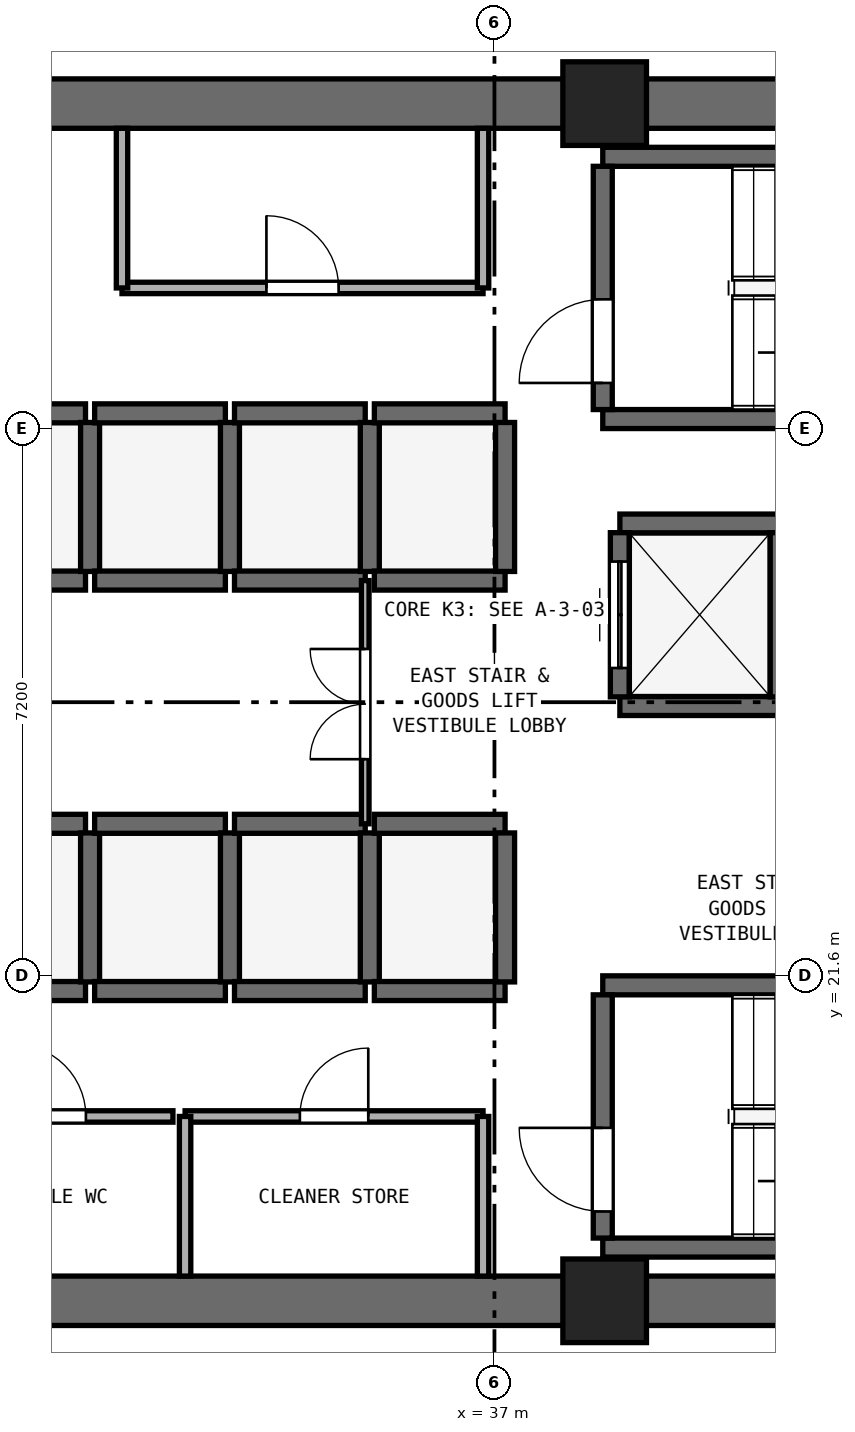
"""IFC4 building model, lengths in metres.
Left out: names, types, materials, properties, quantities, classifications, styles, units other than length and angle.
Written with IfcOpenShell. Run it as: python <this file> out.ifc"""

import sys

from ifc_helpers import new_model, si_unit, direction, frame, frame_2d, origin, origin_2d, place, context, subcontext, project, spatial, rectangle, extrude, element, fill, save


model = new_model("IFC4")
c1 = context("Model", 3, precision=1e-05, world=origin(), true_north=direction((0.0, 1.0)))
c2 = subcontext(c1, "Body", "Model", "MODEL_VIEW")
j1 = project(units=[si_unit("LENGTHUNIT", "METRE"), si_unit("PLANEANGLEUNIT", "RADIAN")], contexts=[c1])
p1 = place(None, origin())
s1 = spatial("IfcSite", under=j1, at=p1, CompositionType="ELEMENT")
p2 = place(p1, origin())
s2 = spatial("IfcBuilding", under=s1, at=p2, CompositionType="ELEMENT")
p3 = place(p2, frame((0.0, 0.0, 97.2)))
s3 = spatial("IfcBuildingStorey", under=s2, at=p3, CompositionType="ELEMENT", Elevation=97.2)
for number, where, z_axis, x_axis in (
    (1, (25.4, 17.325, 0.0), (0.0, 0.0, 1.0), (1.0, 0.0, 0.0)),
    (2, (25.4, 33.075, 0.0), (0.0, 0.0, 1.0), (1.0, 0.0, 0.0)),
):
    element("IfcWall", number, at=place(p3, frame(where, z_axis=z_axis, x_axis=x_axis)), inside=s3, PredefinedType="SHEAR", context=c2, shape_type="SweptSolid", body=[
        extrude(rectangle(XDim=23.2, YDim=0.65, at=frame_2d((11.6, 0.0))), origin(), (0.0, 0.0, 1.0), 3.525),
    ])
for number, where, z_axis, x_axis in (
    (3, (38.45, 17.325, 0.0), (0.0, 0.0, 1.0), (1.0, 0.0, 0.0)),
    (4, (38.45, 33.075, 0.0), (0.0, 0.0, 1.0), (1.0, 0.0, 0.0)),
):
    element("IfcColumn", number, at=place(p3, frame(where, z_axis=z_axis, x_axis=x_axis)), inside=s3, PredefinedType="PILASTER", context=c2, shape_type="SweptSolid", body=[
        extrude(rectangle(XDim=1.1, YDim=1.1, at=origin_2d()), origin(), (0.0, 0.0, 1.0), 3.8),
    ])
for number, where, z_axis, x_axis in (
    (5, (38.425, 28.925, 0.0), (0.0, 0.0, 1.0), (1.0, 0.0, 0.0)),
    (6, (38.425, 32.375, 0.0), (0.0, 0.0, 1.0), (1.0, 0.0, 0.0)),
):
    element("IfcWall", number, at=place(p3, frame(where, z_axis=z_axis, x_axis=x_axis)), inside=s3, PredefinedType="SHEAR", context=c2, shape_type="SweptSolid", body=[
        extrude(rectangle(XDim=7.3, YDim=0.25, at=frame_2d((3.65, 0.0))), origin(), (0.0, 0.0, 1.0), 3.525),
    ])
p4 = place(p3, frame((38.425, 29.05, 0.0), z_axis=(0.0, 0.0, 1.0), x_axis=(0.0, 1.0, 0.0)))
e7 = element("IfcWall", 7, at=p4, inside=s3, PredefinedType="SHEAR", context=c2, shape_type="SweptSolid", body=[
    extrude(rectangle(XDim=3.2, YDim=0.25, at=frame_2d((1.6, 0.0))), origin(), (0.0, 0.0, 1.0), 3.525),
])
p5 = place(p4, frame((0.35, 0.0, 0.0)))
e8 = element("IfcOpeningElement", 8, at=p5, cuts=e7, PredefinedType="OPENING", context=c2, shape_type="SweptSolid", body=[
    extrude(rectangle(XDim=1.1, YDim=2.15, at=frame_2d((0.55, 1.075))), frame((0.0, 0.135, 0.0), z_axis=(0.0, -1.0, 0.0), x_axis=(1.0, 0.0, 0.0)), (0.0, 0.0, 1.0), 0.27),
])
for number, where, z_axis, x_axis in (
    (9, (38.425, 18.025, 0.0), (0.0, 0.0, 1.0), (1.0, 0.0, 0.0)),
    (10, (38.425, 21.475, 0.0), (0.0, 0.0, 1.0), (1.0, 0.0, 0.0)),
):
    element("IfcWall", number, at=place(p3, frame(where, z_axis=z_axis, x_axis=x_axis)), inside=s3, PredefinedType="SHEAR", context=c2, shape_type="SweptSolid", body=[
        extrude(rectangle(XDim=7.3, YDim=0.25, at=frame_2d((3.65, 0.0))), origin(), (0.0, 0.0, 1.0), 3.525),
    ])
p6 = place(p3, frame((38.425, 18.15, 0.0), z_axis=(0.0, 0.0, 1.0), x_axis=(0.0, 1.0, 0.0)))
e11 = element("IfcWall", 11, at=p6, inside=s3, PredefinedType="SHEAR", context=c2, shape_type="SweptSolid", body=[
    extrude(rectangle(XDim=3.2, YDim=0.25, at=frame_2d((1.6, 0.0))), origin(), (0.0, 0.0, 1.0), 3.525),
])
p7 = place(p6, frame((0.35, 0.0, 0.0)))
e12 = element("IfcOpeningElement", 12, at=p7, cuts=e11, PredefinedType="OPENING", context=c2, shape_type="SweptSolid", body=[
    extrude(rectangle(XDim=1.1, YDim=2.15, at=frame_2d((0.55, 1.075))), frame((0.0, 0.135, 0.0), z_axis=(0.0, -1.0, 0.0), x_axis=(1.0, 0.0, 0.0)), (0.0, 0.0, 1.0), 0.27),
])
for number, where, z_axis, x_axis in (
    (13, (29.9, 21.4, 0.0), (0.0, 0.0, 1.0), (1.0, 0.0, 0.0)),
    (14, (29.9, 23.6, 0.0), (0.0, 0.0, 1.0), (1.0, 0.0, 0.0)),
):
    element("IfcWall", number, at=place(p3, frame(where, z_axis=z_axis, x_axis=x_axis)), inside=s3, PredefinedType="SHEAR", context=c2, shape_type="SweptSolid", body=[
        extrude(rectangle(XDim=1.72, YDim=0.25, at=frame_2d((0.86, 0.0))), origin(), (0.0, 0.0, 1.0), 3.525),
    ])
p8 = place(p3, frame((31.68, 21.52, 0.0), z_axis=(0.0, 0.0, 1.0), x_axis=(0.0, 1.0, 0.0)))
e15 = element("IfcWall", 15, at=p8, inside=s3, PredefinedType="SHEAR", context=c2, shape_type="SweptSolid", body=[
    extrude(rectangle(XDim=1.96, YDim=0.25, at=frame_2d((0.98, 0.0))), origin(), (0.0, 0.0, 1.0), 3.525),
])
for number, where, z_axis, x_axis in (
    (16, (31.74, 21.4, 0.0), (0.0, 0.0, 1.0), (1.0, 0.0, 0.0)),
    (17, (31.74, 23.6, 0.0), (0.0, 0.0, 1.0), (1.0, 0.0, 0.0)),
):
    element("IfcWall", number, at=place(p3, frame(where, z_axis=z_axis, x_axis=x_axis)), inside=s3, PredefinedType="SHEAR", context=c2, shape_type="SweptSolid", body=[
        extrude(rectangle(XDim=1.72, YDim=0.25, at=frame_2d((0.86, 0.0))), origin(), (0.0, 0.0, 1.0), 3.525),
    ])
p9 = place(p3, frame((33.52, 21.52, 0.0), z_axis=(0.0, 0.0, 1.0), x_axis=(0.0, 1.0, 0.0)))
e18 = element("IfcWall", 18, at=p9, inside=s3, PredefinedType="SHEAR", context=c2, shape_type="SweptSolid", body=[
    extrude(rectangle(XDim=1.96, YDim=0.25, at=frame_2d((0.98, 0.0))), origin(), (0.0, 0.0, 1.0), 3.525),
])
for number, where, z_axis, x_axis in (
    (19, (33.58, 21.4, 0.0), (0.0, 0.0, 1.0), (1.0, 0.0, 0.0)),
    (20, (33.58, 23.6, 0.0), (0.0, 0.0, 1.0), (1.0, 0.0, 0.0)),
):
    element("IfcWall", number, at=place(p3, frame(where, z_axis=z_axis, x_axis=x_axis)), inside=s3, PredefinedType="SHEAR", context=c2, shape_type="SweptSolid", body=[
        extrude(rectangle(XDim=1.72, YDim=0.25, at=frame_2d((0.86, 0.0))), origin(), (0.0, 0.0, 1.0), 3.525),
    ])
p10 = place(p3, frame((35.36, 21.52, 0.0), z_axis=(0.0, 0.0, 1.0), x_axis=(0.0, 1.0, 0.0)))
e21 = element("IfcWall", 21, at=p10, inside=s3, PredefinedType="SHEAR", context=c2, shape_type="SweptSolid", body=[
    extrude(rectangle(XDim=1.96, YDim=0.25, at=frame_2d((0.98, 0.0))), origin(), (0.0, 0.0, 1.0), 3.525),
])
for number, where, z_axis, x_axis in (
    (22, (35.42, 21.4, 0.0), (0.0, 0.0, 1.0), (1.0, 0.0, 0.0)),
    (23, (35.42, 23.6, 0.0), (0.0, 0.0, 1.0), (1.0, 0.0, 0.0)),
):
    element("IfcWall", number, at=place(p3, frame(where, z_axis=z_axis, x_axis=x_axis)), inside=s3, PredefinedType="SHEAR", context=c2, shape_type="SweptSolid", body=[
        extrude(rectangle(XDim=1.72, YDim=0.25, at=frame_2d((0.86, 0.0))), origin(), (0.0, 0.0, 1.0), 3.525),
    ])
p11 = place(p3, frame((37.14, 21.52, 0.0), z_axis=(0.0, 0.0, 1.0), x_axis=(0.0, 1.0, 0.0)))
e24 = element("IfcWall", 24, at=p11, inside=s3, PredefinedType="SHEAR", context=c2, shape_type="SweptSolid", body=[
    extrude(rectangle(XDim=1.96, YDim=0.25, at=frame_2d((0.98, 0.0))), origin(), (0.0, 0.0, 1.0), 3.525),
])
for number, where, z_axis, x_axis in (
    (25, (29.9, 26.8, 0.0), (0.0, 0.0, 1.0), (1.0, 0.0, 0.0)),
    (26, (29.9, 29.0, 0.0), (0.0, 0.0, 1.0), (1.0, 0.0, 0.0)),
):
    element("IfcWall", number, at=place(p3, frame(where, z_axis=z_axis, x_axis=x_axis)), inside=s3, PredefinedType="SHEAR", context=c2, shape_type="SweptSolid", body=[
        extrude(rectangle(XDim=1.72, YDim=0.25, at=frame_2d((0.86, 0.0))), origin(), (0.0, 0.0, 1.0), 3.525),
    ])
p12 = place(p3, frame((31.68, 26.92, 0.0), z_axis=(0.0, 0.0, 1.0), x_axis=(0.0, 1.0, 0.0)))
e27 = element("IfcWall", 27, at=p12, inside=s3, PredefinedType="SHEAR", context=c2, shape_type="SweptSolid", body=[
    extrude(rectangle(XDim=1.96, YDim=0.25, at=frame_2d((0.98, 0.0))), origin(), (0.0, 0.0, 1.0), 3.525),
])
for number, where, z_axis, x_axis in (
    (28, (31.74, 26.8, 0.0), (0.0, 0.0, 1.0), (1.0, 0.0, 0.0)),
    (29, (31.74, 29.0, 0.0), (0.0, 0.0, 1.0), (1.0, 0.0, 0.0)),
):
    element("IfcWall", number, at=place(p3, frame(where, z_axis=z_axis, x_axis=x_axis)), inside=s3, PredefinedType="SHEAR", context=c2, shape_type="SweptSolid", body=[
        extrude(rectangle(XDim=1.72, YDim=0.25, at=frame_2d((0.86, 0.0))), origin(), (0.0, 0.0, 1.0), 3.525),
    ])
p13 = place(p3, frame((33.52, 26.92, 0.0), z_axis=(0.0, 0.0, 1.0), x_axis=(0.0, 1.0, 0.0)))
e30 = element("IfcWall", 30, at=p13, inside=s3, PredefinedType="SHEAR", context=c2, shape_type="SweptSolid", body=[
    extrude(rectangle(XDim=1.96, YDim=0.25, at=frame_2d((0.98, 0.0))), origin(), (0.0, 0.0, 1.0), 3.525),
])
for number, where, z_axis, x_axis in (
    (31, (33.58, 26.8, 0.0), (0.0, 0.0, 1.0), (1.0, 0.0, 0.0)),
    (32, (33.58, 29.0, 0.0), (0.0, 0.0, 1.0), (1.0, 0.0, 0.0)),
):
    element("IfcWall", number, at=place(p3, frame(where, z_axis=z_axis, x_axis=x_axis)), inside=s3, PredefinedType="SHEAR", context=c2, shape_type="SweptSolid", body=[
        extrude(rectangle(XDim=1.72, YDim=0.25, at=frame_2d((0.86, 0.0))), origin(), (0.0, 0.0, 1.0), 3.525),
    ])
p14 = place(p3, frame((35.36, 26.92, 0.0), z_axis=(0.0, 0.0, 1.0), x_axis=(0.0, 1.0, 0.0)))
e33 = element("IfcWall", 33, at=p14, inside=s3, PredefinedType="SHEAR", context=c2, shape_type="SweptSolid", body=[
    extrude(rectangle(XDim=1.96, YDim=0.25, at=frame_2d((0.98, 0.0))), origin(), (0.0, 0.0, 1.0), 3.525),
])
for number, where, z_axis, x_axis in (
    (34, (35.42, 26.8, 0.0), (0.0, 0.0, 1.0), (1.0, 0.0, 0.0)),
    (35, (35.42, 29.0, 0.0), (0.0, 0.0, 1.0), (1.0, 0.0, 0.0)),
):
    element("IfcWall", number, at=place(p3, frame(where, z_axis=z_axis, x_axis=x_axis)), inside=s3, PredefinedType="SHEAR", context=c2, shape_type="SweptSolid", body=[
        extrude(rectangle(XDim=1.72, YDim=0.25, at=frame_2d((0.86, 0.0))), origin(), (0.0, 0.0, 1.0), 3.525),
    ])
p15 = place(p3, frame((37.14, 26.92, 0.0), z_axis=(0.0, 0.0, 1.0), x_axis=(0.0, 1.0, 0.0)))
e36 = element("IfcWall", 36, at=p15, inside=s3, PredefinedType="SHEAR", context=c2, shape_type="SweptSolid", body=[
    extrude(rectangle(XDim=1.96, YDim=0.25, at=frame_2d((0.98, 0.0))), origin(), (0.0, 0.0, 1.0), 3.525),
])
for number, where, z_axis, x_axis in (
    (37, (38.65, 25.15, 0.0), (0.0, 0.0, 1.0), (1.0, 0.0, 0.0)),
    (38, (38.65, 27.55, 0.0), (0.0, 0.0, 1.0), (1.0, 0.0, 0.0)),
):
    element("IfcWall", number, at=place(p3, frame(where, z_axis=z_axis, x_axis=x_axis)), inside=s3, PredefinedType="SHEAR", context=c2, shape_type="SweptSolid", body=[
        extrude(rectangle(XDim=2.1, YDim=0.25, at=frame_2d((1.05, 0.0))), origin(), (0.0, 0.0, 1.0), 3.525),
    ])
p16 = place(p3, frame((38.65, 25.27, 0.0), z_axis=(0.0, 0.0, 1.0), x_axis=(0.0, 1.0, 0.0)))
e39 = element("IfcWall", 39, at=p16, inside=s3, PredefinedType="SHEAR", context=c2, shape_type="SweptSolid", body=[
    extrude(rectangle(XDim=2.16, YDim=0.25, at=frame_2d((1.08, 0.0))), origin(), (0.0, 0.0, 1.0), 3.525),
])
p17 = place(p16, frame((0.38, 0.0, 0.0)))
e40 = element("IfcOpeningElement", 40, at=p17, cuts=e39, PredefinedType="OPENING", context=c2, shape_type="SweptSolid", body=[
    extrude(rectangle(XDim=1.4, YDim=2.2, at=frame_2d((0.7, 1.1))), frame((0.0, 0.135, 0.0), z_axis=(0.0, -1.0, 0.0), x_axis=(1.0, 0.0, 0.0)), (0.0, 0.0, 1.0), 0.27),
])
p18 = place(p3, frame((40.75, 25.27, 0.0), z_axis=(0.0, 0.0, 1.0), x_axis=(0.0, 1.0, 0.0)))
e41 = element("IfcWall", 41, at=p18, inside=s3, PredefinedType="SHEAR", context=c2, shape_type="SweptSolid", body=[
    extrude(rectangle(XDim=2.16, YDim=0.25, at=frame_2d((1.08, 0.0))), origin(), (0.0, 0.0, 1.0), 3.525),
])
p19 = place(p3, frame((32.1, 30.65, 0.0), z_axis=(0.0, 0.0, 1.0), x_axis=(1.0, 0.0, 0.0)))
e42 = element("IfcWall", 42, at=p19, inside=s3, PredefinedType="PARTITIONING", context=c2, shape_type="SweptSolid", body=[
    extrude(rectangle(XDim=4.75, YDim=0.15, at=frame_2d((2.375, 0.0))), origin(), (0.0, 0.0, 1.0), 3.525),
])
p20 = place(p19, frame((1.9, 0.0, 0.0)))
e43 = element("IfcOpeningElement", 43, at=p20, cuts=e42, PredefinedType="OPENING", context=c2, shape_type="SweptSolid", body=[
    extrude(rectangle(XDim=0.95, YDim=2.1, at=frame_2d((0.475, 1.05))), frame((0.0, 0.085, 0.0), z_axis=(0.0, -1.0, 0.0), x_axis=(1.0, 0.0, 0.0)), (0.0, 0.0, 1.0), 0.17),
])
for number, where, z_axis, x_axis in (
    (44, (32.1, 30.65, 0.0), (0.0, 0.0, 1.0), (0.0, 1.0, 0.0)),
    (45, (36.85, 30.65, 0.0), (0.0, 0.0, 1.0), (0.0, 1.0, 0.0)),
):
    element("IfcWall", number, at=place(p3, frame(where, z_axis=z_axis, x_axis=x_axis)), inside=s3, PredefinedType="PARTITIONING", context=c2, shape_type="SweptSolid", body=[
        extrude(rectangle(XDim=2.1, YDim=0.15, at=frame_2d((1.05, 0.0))), origin(), (0.0, 0.0, 1.0), 3.525),
    ])
p21 = place(p3, frame((29.53, 19.75, 0.0), z_axis=(0.0, 0.0, 1.0), x_axis=(1.0, 0.0, 0.0)))
e46 = element("IfcWall", 46, at=p21, inside=s3, PredefinedType="PARTITIONING", context=c2, shape_type="SweptSolid", body=[
    extrude(rectangle(XDim=3.24, YDim=0.15, at=frame_2d((1.62, 0.0))), origin(), (0.0, 0.0, 1.0), 3.525),
])
p22 = place(p21, frame((1.145, 0.0, 0.0)))
e47 = element("IfcOpeningElement", 47, at=p22, cuts=e46, PredefinedType="OPENING", context=c2, shape_type="SweptSolid", body=[
    extrude(rectangle(XDim=0.95, YDim=2.1, at=frame_2d((0.475, 1.05))), frame((0.0, 0.085, 0.0), z_axis=(0.0, -1.0, 0.0), x_axis=(1.0, 0.0, 0.0)), (0.0, 0.0, 1.0), 0.17),
])
p23 = place(p3, frame((32.93, 19.75, 0.0), z_axis=(0.0, 0.0, 1.0), x_axis=(1.0, 0.0, 0.0)))
e48 = element("IfcWall", 48, at=p23, inside=s3, PredefinedType="PARTITIONING", context=c2, shape_type="SweptSolid", body=[
    extrude(rectangle(XDim=3.92, YDim=0.15, at=frame_2d((1.96, 0.0))), origin(), (0.0, 0.0, 1.0), 3.525),
])
p24 = place(p23, frame((1.51, 0.0, 0.0)))
e49 = element("IfcOpeningElement", 49, at=p24, cuts=e48, PredefinedType="OPENING", context=c2, shape_type="SweptSolid", body=[
    extrude(rectangle(XDim=0.9, YDim=2.1, at=frame_2d((0.45, 1.05))), frame((0.0, 0.085, 0.0), z_axis=(0.0, -1.0, 0.0), x_axis=(1.0, 0.0, 0.0)), (0.0, 0.0, 1.0), 0.17),
])
for number, where, z_axis, x_axis in (
    (50, (32.93, 17.65, 0.0), (0.0, 0.0, 1.0), (0.0, 1.0, 0.0)),
    (51, (36.85, 17.65, 0.0), (0.0, 0.0, 1.0), (0.0, 1.0, 0.0)),
):
    element("IfcWall", number, at=place(p3, frame(where, z_axis=z_axis, x_axis=x_axis)), inside=s3, PredefinedType="PARTITIONING", context=c2, shape_type="SweptSolid", body=[
        extrude(rectangle(XDim=2.1, YDim=0.15, at=frame_2d((1.05, 0.0))), origin(), (0.0, 0.0, 1.0), 3.525),
    ])
p25 = place(p3, frame((35.3, 23.6, 0.0), z_axis=(0.0, 0.0, 1.0), x_axis=(0.0, 1.0, 0.0)))
e52 = element("IfcWall", 52, at=p25, inside=s3, PredefinedType="PARTITIONING", context=c2, shape_type="SweptSolid", body=[
    extrude(rectangle(XDim=3.2, YDim=0.1, at=frame_2d((1.6, 0.0))), origin(), (0.0, 0.0, 1.0), 3.525),
])
p26 = place(p25, frame((0.85, 0.0, 0.0)))
e53 = element("IfcOpeningElement", 53, at=p26, cuts=e52, PredefinedType="OPENING", context=c2, shape_type="SweptSolid", body=[
    extrude(rectangle(XDim=1.45, YDim=2.12, at=frame_2d((0.725, 1.06))), frame((0.0, 0.06, 0.0), z_axis=(0.0, -1.0, 0.0), x_axis=(1.0, 0.0, 0.0)), (0.0, 0.0, 1.0), 0.12),
])
p27 = place(p5, origin())
e54 = element("IfcDoor", 54, at=p27, inside=s3, OperationType="SINGLE_SWING_LEFT", PredefinedType="DOOR", context=c2, shape_type="SweptSolid", body=[
    extrude(rectangle(XDim=1.1, YDim=2.15, at=frame_2d((0.55, 1.075))), frame((0.0, 0.025, 0.0), z_axis=(0.0, -1.0, 0.0), x_axis=(1.0, 0.0, 0.0)), (0.0, 0.0, 1.0), 0.05),
])
fill(e8, e54)
p28 = place(p7, origin())
e55 = element("IfcDoor", 55, at=p28, inside=s3, OperationType="SINGLE_SWING_RIGHT", PredefinedType="DOOR", context=c2, shape_type="SweptSolid", body=[
    extrude(rectangle(XDim=1.1, YDim=2.15, at=frame_2d((0.55, 1.075))), frame((0.0, 0.025, 0.0), z_axis=(0.0, -1.0, 0.0), x_axis=(1.0, 0.0, 0.0)), (0.0, 0.0, 1.0), 0.05),
])
fill(e12, e55)
p29 = place(p17, origin())
e56 = element("IfcDoor", 56, at=p29, inside=s3, OperationType="DOUBLE_DOOR_SLIDING", PredefinedType="DOOR", context=c2, shape_type="SweptSolid", body=[
    extrude(rectangle(XDim=1.4, YDim=2.2, at=frame_2d((0.7, 1.1))), frame((0.0, 0.025, 0.0), z_axis=(0.0, -1.0, 0.0), x_axis=(1.0, 0.0, 0.0)), (0.0, 0.0, 1.0), 0.05),
])
fill(e40, e56)
p30 = place(p20, origin())
e57 = element("IfcDoor", 57, at=p30, inside=s3, OperationType="SINGLE_SWING_LEFT", PredefinedType="DOOR", context=c2, shape_type="SweptSolid", body=[
    extrude(rectangle(XDim=0.95, YDim=2.1, at=frame_2d((0.475, 1.05))), frame((0.0, 0.025, 0.0), z_axis=(0.0, -1.0, 0.0), x_axis=(1.0, 0.0, 0.0)), (0.0, 0.0, 1.0), 0.05),
])
fill(e43, e57)
p31 = place(p22, origin())
e58 = element("IfcDoor", 58, at=p31, inside=s3, OperationType="SINGLE_SWING_LEFT", PredefinedType="DOOR", context=c2, shape_type="SweptSolid", body=[
    extrude(rectangle(XDim=0.95, YDim=2.1, at=frame_2d((0.475, 1.05))), frame((0.0, 0.025, 0.0), z_axis=(0.0, -1.0, 0.0), x_axis=(1.0, 0.0, 0.0)), (0.0, 0.0, 1.0), 0.05),
])
fill(e47, e58)
p32 = place(p24, origin())
e59 = element("IfcDoor", 59, at=p32, inside=s3, OperationType="SINGLE_SWING_RIGHT", PredefinedType="DOOR", context=c2, shape_type="SweptSolid", body=[
    extrude(rectangle(XDim=0.9, YDim=2.1, at=frame_2d((0.45, 1.05))), frame((0.0, 0.025, 0.0), z_axis=(0.0, -1.0, 0.0), x_axis=(1.0, 0.0, 0.0)), (0.0, 0.0, 1.0), 0.05),
])
fill(e49, e59)
p33 = place(p26, origin())
e60 = element("IfcDoor", 60, at=p33, inside=s3, OperationType="DOUBLE_DOOR_SINGLE_SWING", PredefinedType="DOOR", context=c2, shape_type="SweptSolid", body=[
    extrude(rectangle(XDim=1.45, YDim=2.12, at=frame_2d((0.725, 1.06))), frame((0.0, 0.025, 0.0), z_axis=(0.0, -1.0, 0.0), x_axis=(1.0, 0.0, 0.0)), (0.0, 0.0, 1.0), 0.05),
])
fill(e53, e60)
save(model, sys.argv[1])
